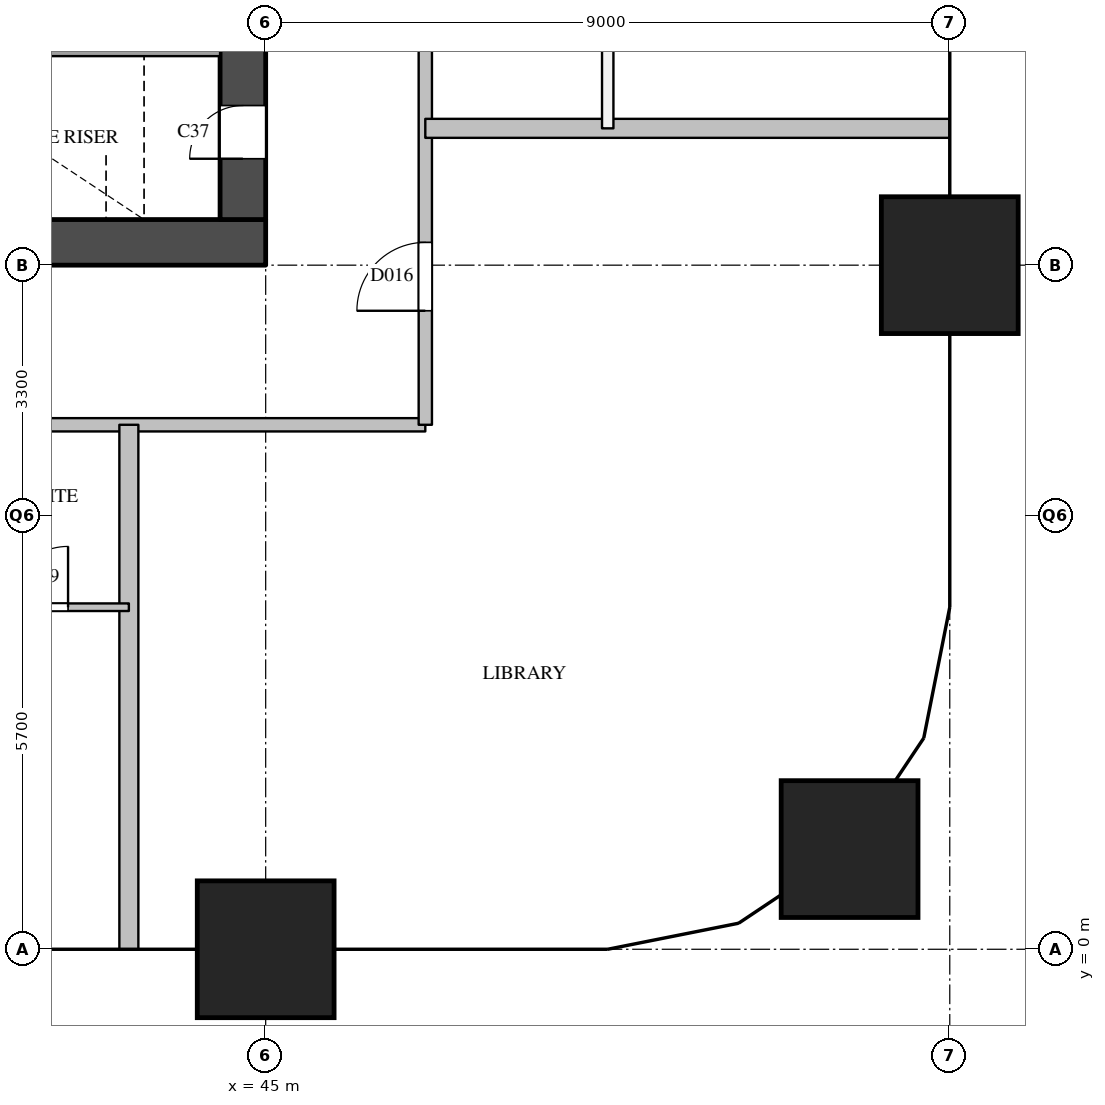
"""IFC4 building model, lengths in metres.
Left out: names, types, materials, properties, quantities, classifications, styles, units other than length and angle.
Written with IfcOpenShell. Run it as: python <this file> out.ifc"""

import sys

from ifc_helpers import new_model, si_unit, direction, frame, frame_2d, origin, origin_2d, place, context, subcontext, project, spatial, rectangle, extrude, element, fill, save


model = new_model("IFC4")
c1 = context("Model", 3, precision=1e-05, world=origin(), true_north=direction((0.0, 1.0)))
c2 = subcontext(c1, "Body", "Model", "MODEL_VIEW")
j1 = project(units=[si_unit("LENGTHUNIT", "METRE"), si_unit("PLANEANGLEUNIT", "RADIAN")], contexts=[c1])
p1 = place(None, origin())
s1 = spatial("IfcSite", under=j1, at=p1, CompositionType="ELEMENT")
p2 = place(p1, origin())
s2 = spatial("IfcBuilding", under=s1, at=p2, CompositionType="ELEMENT")
p3 = place(p2, frame((0.0, 0.0, 69.0)))
s3 = spatial("IfcBuildingStorey", under=s2, at=p3, CompositionType="ELEMENT", Elevation=69.0)
for number, where, z_axis, x_axis in (
    (1, (45.0, 0.0, 0.0), (0.0, 0.0, 1.0), (1.0, 0.0, 0.0)),
    (2, (52.682, 1.318, 0.0), (0.0, 0.0, 1.0), (1.0, 0.0, 0.0)),
    (3, (54.0, 9.0, 0.0), (0.0, 0.0, 1.0), (1.0, 0.0, 0.0)),
):
    element("IfcColumn", number, at=place(p3, frame(where, z_axis=z_axis, x_axis=x_axis)), inside=s3, PredefinedType="COLUMN", context=c2, shape_type="SweptSolid", body=[
        extrude(rectangle(XDim=1.8, YDim=1.8, at=origin_2d()), origin(), (0.0, 0.0, 1.0), 3.8),
    ])
p4 = place(p3, frame((36.0, 9.3, 0.0), z_axis=(0.0, 0.0, 1.0), x_axis=(1.0, 0.0, 0.0)))
e4 = element("IfcWall", 4, at=p4, inside=s3, PredefinedType="SHEAR", context=c2, shape_type="SweptSolid", body=[
    extrude(rectangle(XDim=9.0, YDim=0.6, at=frame_2d((4.5, 0.0))), origin(), (0.0, 0.0, 1.0), 3.5),
])
p5 = place(p3, frame((44.7, 9.6, 0.0), z_axis=(0.0, 0.0, 1.0), x_axis=(0.0, 1.0, 0.0)))
e5 = element("IfcWall", 5, at=p5, inside=s3, PredefinedType="SHEAR", context=c2, shape_type="SweptSolid", body=[
    extrude(rectangle(XDim=12.3, YDim=0.6, at=frame_2d((6.15, 0.0))), origin(), (0.0, 0.0, 1.0), 3.5),
])
p6 = place(p5, frame((0.8, 0.0, 0.0)))
e6 = element("IfcOpeningElement", 6, at=p6, cuts=e5, PredefinedType="OPENING", context=c2, shape_type="SweptSolid", body=[
    extrude(rectangle(XDim=0.7, YDim=2.1, at=frame_2d((0.35, 1.05))), frame((0.0, 0.31, 0.0), z_axis=(0.0, -1.0, 0.0), x_axis=(1.0, 0.0, 0.0)), (0.0, 0.0, 1.0), 0.62),
])
p7 = place(p3, frame((36.6, 11.85, 0.0), z_axis=(0.0, 0.0, 1.0), x_axis=(1.0, 0.0, 0.0)))
e7 = element("IfcWall", 7, at=p7, inside=s3, PredefinedType="SOLIDWALL", context=c2, shape_type="SweptSolid", body=[
    extrude(rectangle(XDim=7.8, YDim=0.2, at=frame_2d((3.9, 0.0))), origin(), (0.0, 0.0, 1.0), 3.5),
])
p8 = place(p3, frame((33.9, 6.9, 0.0), z_axis=(0.0, 0.0, 1.0), x_axis=(1.0, 0.0, 0.0)))
e8 = element("IfcWall", 8, at=p8, inside=s3, PredefinedType="PARTITIONING", context=c2, shape_type="SweptSolid", body=[
    extrude(rectangle(XDim=13.2, YDim=0.175, at=frame_2d((6.6, 0.0))), origin(), (0.0, 0.0, 1.0), 3.5),
])
p9 = place(p8, frame((4.0, 0.0, 0.0)))
e9 = element("IfcOpeningElement", 9, at=p9, cuts=e8, PredefinedType="OPENING", context=c2, shape_type="SweptSolid", body=[
    extrude(rectangle(XDim=1.0, YDim=2.1, at=frame_2d((0.5, 1.05))), frame((0.0, 0.097, 0.0), z_axis=(0.0, -1.0, 0.0), x_axis=(1.0, 0.0, 0.0)), (0.0, 0.0, 1.0), 0.195),
])
p10 = place(p3, frame((47.1, 6.9, 0.0), z_axis=(0.0, 0.0, 1.0), x_axis=(0.0, 1.0, 0.0)))
e10 = element("IfcWall", 10, at=p10, inside=s3, PredefinedType="PARTITIONING", context=c2, shape_type="SweptSolid", body=[
    extrude(rectangle(XDim=17.09, YDim=0.175, at=frame_2d((8.545, 0.0))), origin(), (0.0, 0.0, 1.0), 3.5),
])
p11 = place(p10, frame((1.5, 0.0, 0.0)))
e11 = element("IfcOpeningElement", 11, at=p11, cuts=e10, PredefinedType="OPENING", context=c2, shape_type="SweptSolid", body=[
    extrude(rectangle(XDim=0.9, YDim=2.1, at=frame_2d((0.45, 1.05))), frame((0.0, 0.097, 0.0), z_axis=(0.0, -1.0, 0.0), x_axis=(1.0, 0.0, 0.0)), (0.0, 0.0, 1.0), 0.195),
])
p12 = place(p10, frame((5.8, 0.0, 0.0)))
e12 = element("IfcOpeningElement", 12, at=p12, cuts=e10, PredefinedType="OPENING", context=c2, shape_type="SweptSolid", body=[
    extrude(rectangle(XDim=1.0, YDim=2.1, at=frame_2d((0.5, 1.05))), frame((0.0, 0.097, 0.0), z_axis=(0.0, -1.0, 0.0), x_axis=(1.0, 0.0, 0.0)), (0.0, 0.0, 1.0), 0.195),
])
p13 = place(p10, frame((13.645, 0.0, 0.0)))
e13 = element("IfcOpeningElement", 13, at=p13, cuts=e10, PredefinedType="OPENING", context=c2, shape_type="SweptSolid", body=[
    extrude(rectangle(XDim=0.9, YDim=2.1, at=frame_2d((0.45, 1.05))), frame((0.0, 0.097, 0.0), z_axis=(0.0, -1.0, 0.0), x_axis=(1.0, 0.0, 0.0)), (0.0, 0.0, 1.0), 0.195),
])
p14 = place(p3, frame((49.5, 10.8, 0.0), z_axis=(0.0, 0.0, 1.0), x_axis=(0.0, 1.0, 0.0)))
e14 = element("IfcWall", 14, at=p14, inside=s3, PredefinedType="PARTITIONING", context=c2, shape_type="SweptSolid", body=[
    extrude(rectangle(XDim=4.8, YDim=0.15, at=frame_2d((2.4, 0.0))), origin(), (0.0, 0.0, 1.0), 3.5),
])
p15 = place(p14, frame((1.95, 0.0, 0.0)))
e15 = element("IfcOpeningElement", 15, at=p15, cuts=e14, PredefinedType="OPENING", context=c2, shape_type="SweptSolid", body=[
    extrude(rectangle(XDim=0.9, YDim=2.1, at=frame_2d((0.45, 1.05))), frame((0.0, 0.085, 0.0), z_axis=(0.0, -1.0, 0.0), x_axis=(1.0, 0.0, 0.0)), (0.0, 0.0, 1.0), 0.17),
])
for number, where, z_axis, x_axis in (
    (16, (47.1, 10.8, 0.0), (0.0, 0.0, 1.0), (1.0, 0.0, 0.0)),
    (17, (43.2, 0.0, 0.0), (0.0, 0.0, 1.0), (0.0, 1.0, 0.0)),
):
    element("IfcWall", number, at=place(p3, frame(where, z_axis=z_axis, x_axis=x_axis)), inside=s3, PredefinedType="PARTITIONING", context=c2, shape_type="SweptSolid", body=[
        extrude(rectangle(XDim=6.9, YDim=0.25, at=frame_2d((3.45, 0.0))), origin(), (0.0, 0.0, 1.0), 2.5),
    ])
p16 = place(p3, frame((40.8, 4.5, 0.0), z_axis=(0.0, 0.0, 1.0), x_axis=(1.0, 0.0, 0.0)))
e18 = element("IfcWall", 18, at=p16, inside=s3, PredefinedType="PARTITIONING", context=c2, shape_type="SweptSolid", body=[
    extrude(rectangle(XDim=2.4, YDim=0.1, at=frame_2d((1.2, 0.0))), origin(), (0.0, 0.0, 1.0), 3.5),
])
p17 = place(p16, frame((0.8, 0.0, 0.0)))
e19 = element("IfcOpeningElement", 19, at=p17, cuts=e18, PredefinedType="OPENING", context=c2, shape_type="SweptSolid", body=[
    extrude(rectangle(XDim=0.8, YDim=2.1, at=frame_2d((0.4, 1.05))), frame((0.0, 0.06, 0.0), z_axis=(0.0, -1.0, 0.0), x_axis=(1.0, 0.0, 0.0)), (0.0, 0.0, 1.0), 0.12),
])
p18 = place(p6, origin())
e20 = element("IfcDoor", 20, at=p18, inside=s3, OperationType="SINGLE_SWING_LEFT", PredefinedType="DOOR", context=c2, shape_type="SweptSolid", body=[
    extrude(rectangle(XDim=0.7, YDim=2.1, at=frame_2d((0.35, 1.05))), frame((0.0, 0.025, 0.0), z_axis=(0.0, -1.0, 0.0), x_axis=(1.0, 0.0, 0.0)), (0.0, 0.0, 1.0), 0.05),
])
fill(e6, e20)
p19 = place(p17, origin())
e21 = element("IfcDoor", 21, at=p19, inside=s3, OperationType="SINGLE_SWING_RIGHT", PredefinedType="DOOR", context=c2, shape_type="SweptSolid", body=[
    extrude(rectangle(XDim=0.8, YDim=2.1, at=frame_2d((0.4, 1.05))), frame((0.0, 0.025, 0.0), z_axis=(0.0, -1.0, 0.0), x_axis=(1.0, 0.0, 0.0)), (0.0, 0.0, 1.0), 0.05),
])
fill(e19, e21)
p20 = place(p11, origin())
e22 = element("IfcDoor", 22, at=p20, inside=s3, OperationType="SINGLE_SWING_LEFT", PredefinedType="DOOR", context=c2, shape_type="SweptSolid", body=[
    extrude(rectangle(XDim=0.9, YDim=2.1, at=frame_2d((0.45, 1.05))), frame((0.0, 0.025, 0.0), z_axis=(0.0, -1.0, 0.0), x_axis=(1.0, 0.0, 0.0)), (0.0, 0.0, 1.0), 0.05),
])
fill(e11, e22)
save(model, sys.argv[1])
